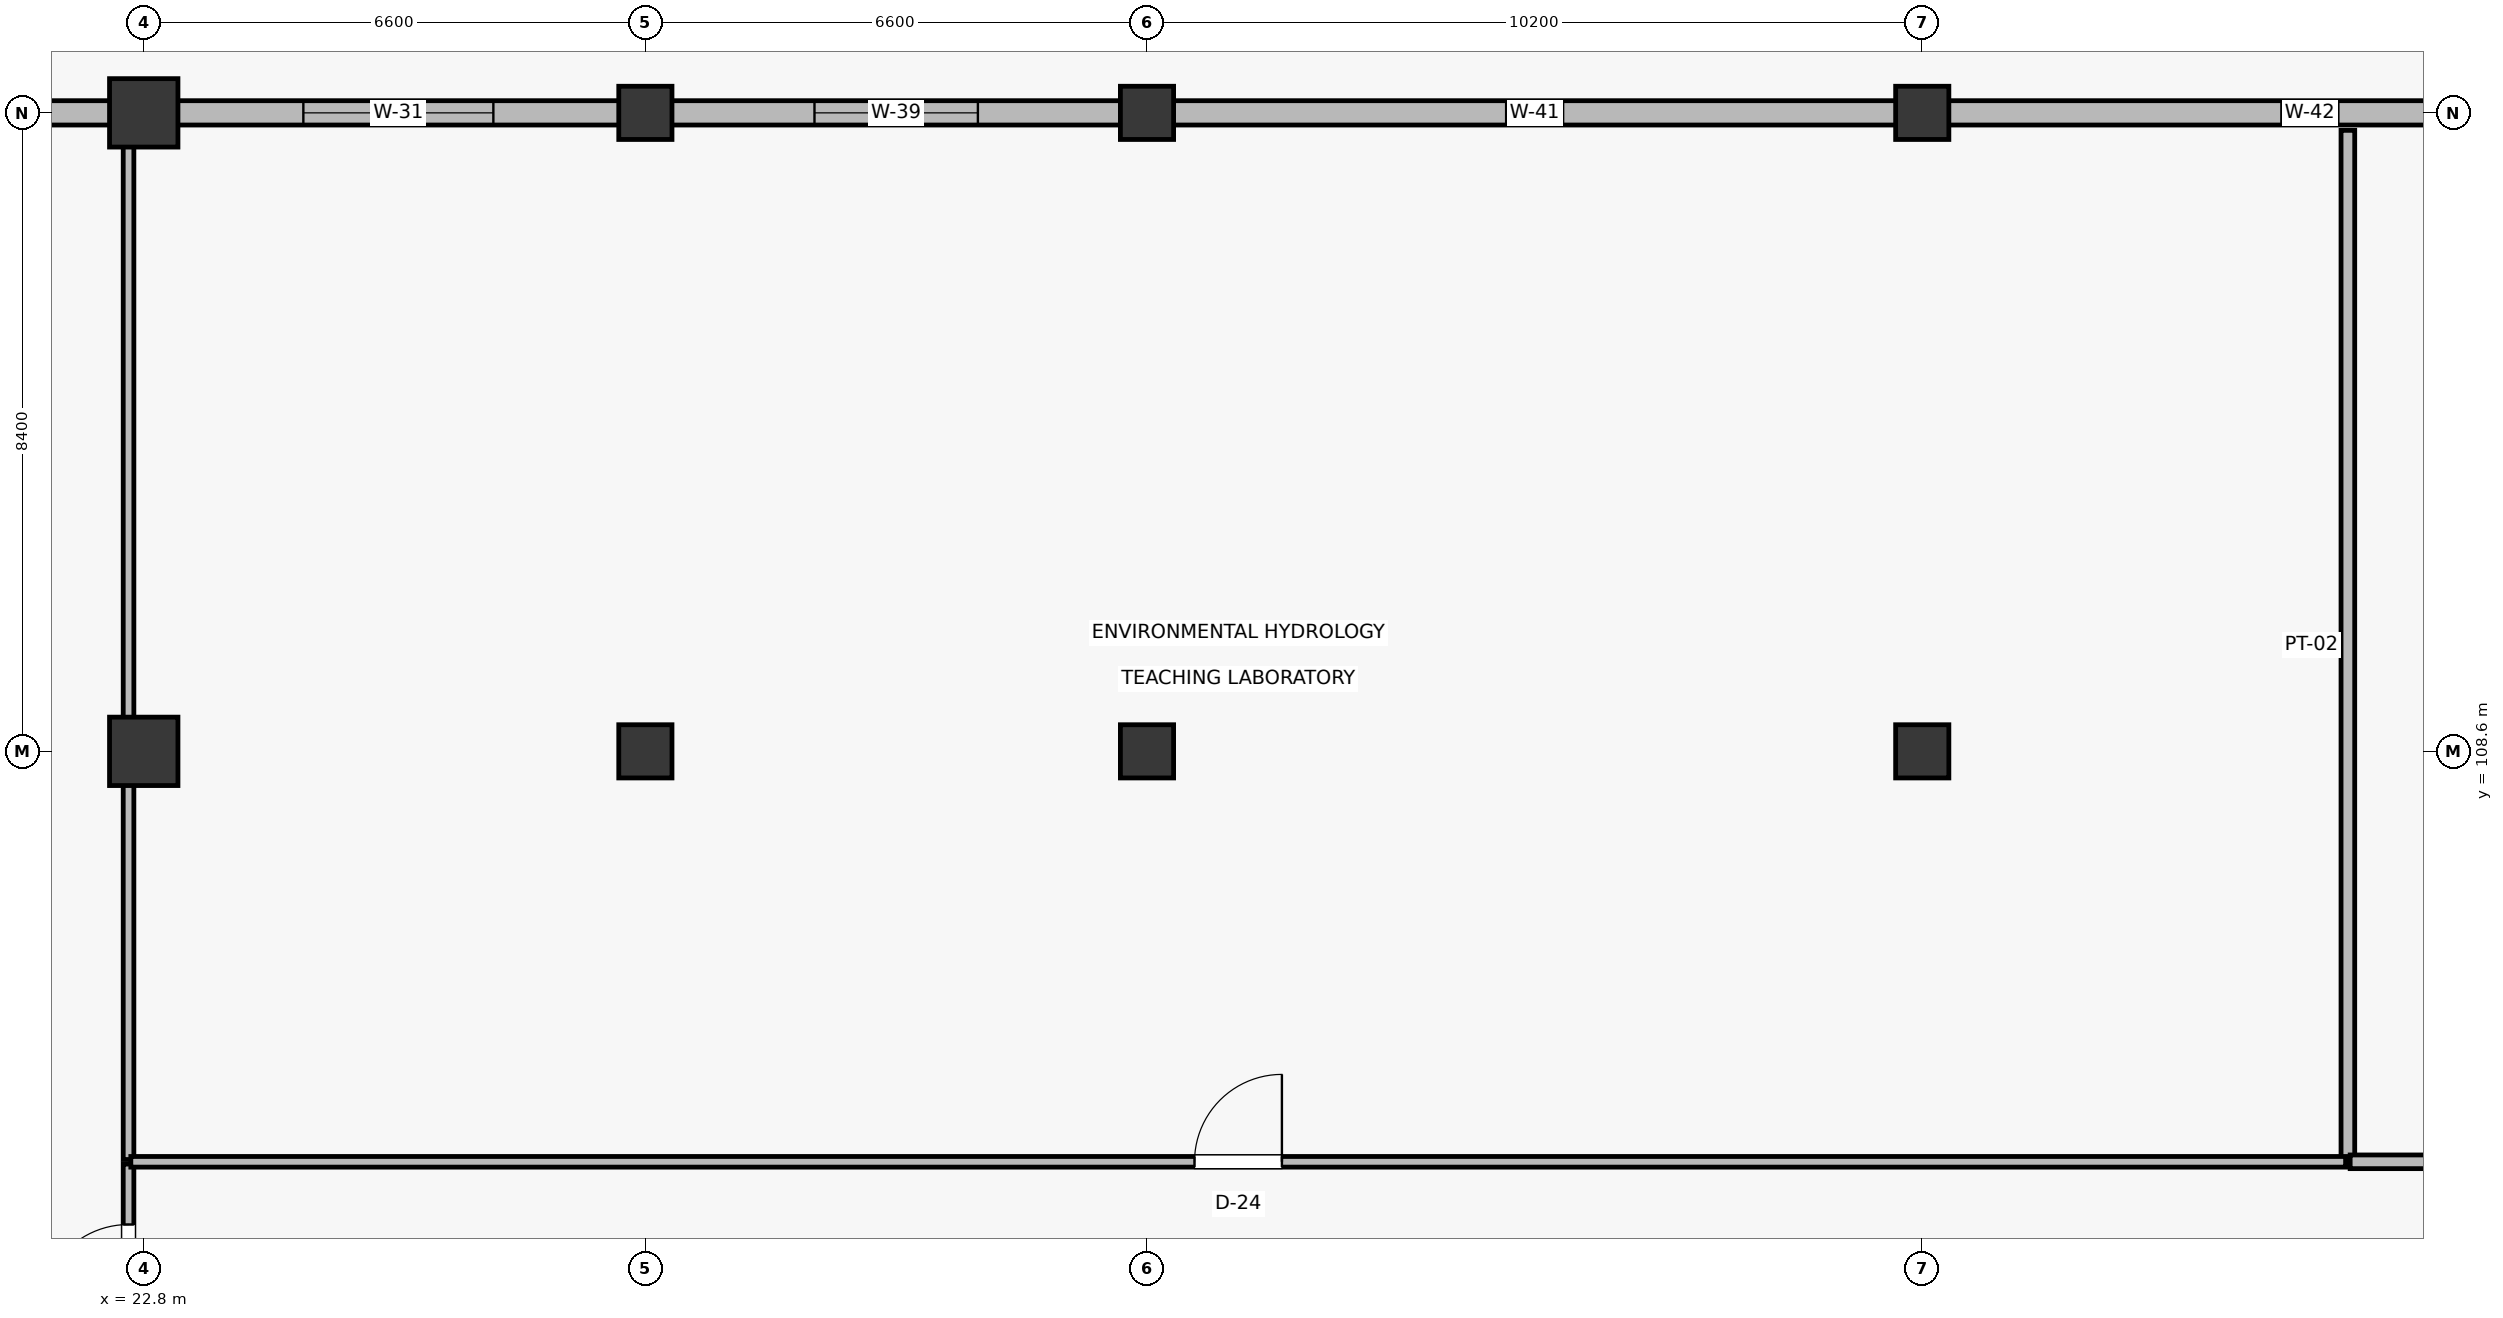
"""IFC4 building model, lengths in metres.
Left out: names, types, materials, properties, quantities, classifications, styles, units other than length and angle.
Written with IfcOpenShell. Run it as: python <this file> out.ifc"""

import sys

from ifc_helpers import new_model, si_unit, direction, frame, frame_2d, origin, origin_2d, place, context, subcontext, project, spatial, rectangle, extrude, element, fill, save


model = new_model("IFC4")
c1 = context("Model", 3, precision=1e-05, world=origin(), true_north=direction((0.0, 1.0)))
c2 = subcontext(c1, "Body", "Model", "MODEL_VIEW")
j1 = project(units=[si_unit("LENGTHUNIT", "METRE"), si_unit("PLANEANGLEUNIT", "RADIAN")], contexts=[c1])
p1 = place(None, origin())
s1 = spatial("IfcSite", under=j1, at=p1, CompositionType="ELEMENT")
p2 = place(p1, origin())
s2 = spatial("IfcBuilding", under=s1, at=p2, CompositionType="ELEMENT")
p3 = place(p2, origin())
s3 = spatial("IfcBuildingStorey", under=s2, at=p3, CompositionType="ELEMENT", Elevation=0.0)
for number, where, z_axis, x_axis in (
    (1, (22.8, 108.6, 0.0), (0.0, 0.0, 1.0), (1.0, 0.0, 0.0)),
    (2, (22.8, 117.0, 0.0), (0.0, 0.0, 1.0), (1.0, 0.0, 0.0)),
):
    element("IfcColumn", number, at=place(p3, frame(where, z_axis=z_axis, x_axis=x_axis)), inside=s3, PredefinedType="COLUMN", context=c2, shape_type="SweptSolid", body=[
        extrude(rectangle(XDim=0.9, YDim=0.9, at=origin_2d()), origin(), (0.0, 0.0, 1.0), 5.4),
    ])
for number, where, z_axis, x_axis in (
    (3, (29.4, 108.6, 0.0), (0.0, 0.0, 1.0), (1.0, 0.0, 0.0)),
    (4, (29.4, 117.0, 0.0), (0.0, 0.0, 1.0), (1.0, 0.0, 0.0)),
    (5, (36.0, 108.6, 0.0), (0.0, 0.0, 1.0), (1.0, 0.0, 0.0)),
    (6, (36.0, 117.0, 0.0), (0.0, 0.0, 1.0), (1.0, 0.0, 0.0)),
    (7, (46.2, 108.6, 0.0), (0.0, 0.0, 1.0), (1.0, 0.0, 0.0)),
    (8, (46.2, 117.0, 0.0), (0.0, 0.0, 1.0), (1.0, 0.0, 0.0)),
):
    element("IfcColumn", number, at=place(p3, frame(where, z_axis=z_axis, x_axis=x_axis)), inside=s3, PredefinedType="COLUMN", context=c2, shape_type="SweptSolid", body=[
        extrude(rectangle(XDim=0.7, YDim=0.7, at=origin_2d()), origin(), (0.0, 0.0, 1.0), 5.4),
    ])
p4 = place(p3, frame((3.435, 117.0, 0.0), z_axis=(0.0, 0.0, 1.0), x_axis=(1.0, 0.0, 0.0)))
e9 = element("IfcWall", 9, at=p4, inside=s3, PredefinedType="SOLIDWALL", context=c2, shape_type="SweptSolid", body=[
    extrude(rectangle(XDim=18.93, YDim=0.32, at=frame_2d((9.465, 0.0))), origin(), (0.0, 0.0, 1.0), 4.375),
])
p5 = place(p4, frame((8.29, 0.0, 0.95)))
e10 = element("IfcOpeningElement", 10, at=p5, cuts=e9, PredefinedType="OPENING", context=c2, shape_type="SweptSolid", body=[
    extrude(rectangle(XDim=2.35, YDim=1.9, at=frame_2d((1.175, 0.95))), frame((0.0, 0.17, 0.0), z_axis=(0.0, -1.0, 0.0), x_axis=(1.0, 0.0, 0.0)), (0.0, 0.0, 1.0), 0.34),
])
p6 = place(p3, frame((23.235, 117.0, 0.0), z_axis=(0.0, 0.0, 1.0), x_axis=(1.0, 0.0, 0.0)))
e11 = element("IfcWall", 11, at=p6, inside=s3, PredefinedType="SOLIDWALL", context=c2, shape_type="SweptSolid", body=[
    extrude(rectangle(XDim=5.83, YDim=0.32, at=frame_2d((2.915, 0.0))), origin(), (0.0, 0.0, 1.0), 4.375),
])
p7 = place(p6, frame((1.665, 0.0, 0.9)))
e12 = element("IfcOpeningElement", 12, at=p7, cuts=e11, PredefinedType="OPENING", context=c2, shape_type="SweptSolid", body=[
    extrude(rectangle(XDim=2.5, YDim=1.95, at=frame_2d((1.25, 0.975))), frame((0.0, 0.17, 0.0), z_axis=(0.0, -1.0, 0.0), x_axis=(1.0, 0.0, 0.0)), (0.0, 0.0, 1.0), 0.34),
])
p8 = place(p3, frame((29.735, 117.0, 0.0), z_axis=(0.0, 0.0, 1.0), x_axis=(1.0, 0.0, 0.0)))
e13 = element("IfcWall", 13, at=p8, inside=s3, PredefinedType="SOLIDWALL", context=c2, shape_type="SweptSolid", body=[
    extrude(rectangle(XDim=5.93, YDim=0.32, at=frame_2d((2.965, 0.0))), origin(), (0.0, 0.0, 1.0), 4.375),
])
p9 = place(p8, frame((1.89, 0.0, 0.9)))
e14 = element("IfcOpeningElement", 14, at=p9, cuts=e13, PredefinedType="OPENING", context=c2, shape_type="SweptSolid", body=[
    extrude(rectangle(XDim=2.15, YDim=1.7, at=frame_2d((1.075, 0.85))), frame((0.0, 0.17, 0.0), z_axis=(0.0, -1.0, 0.0), x_axis=(1.0, 0.0, 0.0)), (0.0, 0.0, 1.0), 0.34),
])
p10 = place(p3, frame((36.335, 117.0, 0.0), z_axis=(0.0, 0.0, 1.0), x_axis=(1.0, 0.0, 0.0)))
e15 = element("IfcWall", 15, at=p10, inside=s3, PredefinedType="SOLIDWALL", context=c2, shape_type="SweptSolid", body=[
    extrude(rectangle(XDim=9.53, YDim=0.32, at=frame_2d((4.765, 0.0))), origin(), (0.0, 0.0, 1.0), 4.375),
])
p11 = place(p10, frame((4.39, 0.0, 0.9)))
e16 = element("IfcOpeningElement", 16, at=p11, cuts=e15, PredefinedType="OPENING", context=c2, shape_type="SweptSolid", body=[
    extrude(rectangle(XDim=0.75, YDim=1.15, at=frame_2d((0.375, 0.575))), frame((0.0, 0.17, 0.0), z_axis=(0.0, -1.0, 0.0), x_axis=(1.0, 0.0, 0.0)), (0.0, 0.0, 1.0), 0.34),
])
p12 = place(p3, frame((46.535, 117.0, 0.0), z_axis=(0.0, 0.0, 1.0), x_axis=(1.0, 0.0, 0.0)))
e17 = element("IfcWall", 17, at=p12, inside=s3, PredefinedType="SOLIDWALL", context=c2, shape_type="SweptSolid", body=[
    extrude(rectangle(XDim=9.53, YDim=0.32, at=frame_2d((4.765, 0.0))), origin(), (0.0, 0.0, 1.0), 4.375),
])
p13 = place(p12, frame((4.39, 0.0, 0.9)))
e18 = element("IfcOpeningElement", 18, at=p13, cuts=e17, PredefinedType="OPENING", context=c2, shape_type="SweptSolid", body=[
    extrude(rectangle(XDim=0.75, YDim=1.35, at=frame_2d((0.375, 0.675))), frame((0.0, 0.17, 0.0), z_axis=(0.0, -1.0, 0.0), x_axis=(1.0, 0.0, 0.0)), (0.0, 0.0, 1.0), 0.34),
])
p14 = place(p3, frame((22.6, 103.23, 0.0), z_axis=(0.0, 0.0, 1.0), x_axis=(0.0, 1.0, 0.0)))
e19 = element("IfcWall", 19, at=p14, inside=s3, PredefinedType="PARTITIONING", context=c2, shape_type="SweptSolid", body=[
    extrude(rectangle(XDim=13.54, YDim=0.14, at=frame_2d((6.77, 0.0))), origin(), (0.0, 0.0, 1.0), 4.425),
])
p15 = place(p3, frame((22.6, 100.43, 0.0), z_axis=(0.0, 0.0, 1.0), x_axis=(0.0, 1.0, 0.0)))
e20 = element("IfcWall", 20, at=p15, inside=s3, PredefinedType="PARTITIONING", context=c2, shape_type="SweptSolid", body=[
    extrude(rectangle(XDim=2.74, YDim=0.14, at=frame_2d((1.37, 0.0))), origin(), (0.0, 0.0, 1.0), 4.425),
])
p16 = place(p15, frame((0.795, 0.0, 0.0)))
e21 = element("IfcOpeningElement", 21, at=p16, cuts=e20, PredefinedType="OPENING", context=c2, shape_type="SweptSolid", body=[
    extrude(rectangle(XDim=1.15, YDim=2.15, at=frame_2d((0.575, 1.075))), frame((0.0, 0.08, 0.0), z_axis=(0.0, -1.0, 0.0), x_axis=(1.0, 0.0, 0.0)), (0.0, 0.0, 1.0), 0.16),
])
p17 = place(p3, frame((51.8, 103.23, 0.0), z_axis=(0.0, 0.0, 1.0), x_axis=(0.0, 1.0, 0.0)))
e22 = element("IfcWall", 22, at=p17, inside=s3, PredefinedType="PARTITIONING", context=c2, shape_type="SweptSolid", body=[
    extrude(rectangle(XDim=13.54, YDim=0.18, at=frame_2d((6.77, 0.0))), origin(), (0.0, 0.0, 1.0), 4.315),
])
p18 = place(p3, frame((22.63, 103.2, 0.0), z_axis=(0.0, 0.0, 1.0), x_axis=(1.0, 0.0, 0.0)))
e23 = element("IfcWall", 23, at=p18, inside=s3, PredefinedType="PARTITIONING", context=c2, shape_type="SweptSolid", body=[
    extrude(rectangle(XDim=29.14, YDim=0.14, at=frame_2d((14.57, 0.0))), origin(), (0.0, 0.0, 1.0), 4.425),
])
p19 = place(p18, frame((13.995, 0.0, 0.0)))
e24 = element("IfcOpeningElement", 24, at=p19, cuts=e23, PredefinedType="OPENING", context=c2, shape_type="SweptSolid", body=[
    extrude(rectangle(XDim=1.15, YDim=2.15, at=frame_2d((0.575, 1.075))), frame((0.0, 0.08, 0.0), z_axis=(0.0, -1.0, 0.0), x_axis=(1.0, 0.0, 0.0)), (0.0, 0.0, 1.0), 0.16),
])
p20 = place(p3, frame((51.83, 103.2, 0.0), z_axis=(0.0, 0.0, 1.0), x_axis=(1.0, 0.0, 0.0)))
e25 = element("IfcWall", 25, at=p20, inside=s3, PredefinedType="PARTITIONING", context=c2, shape_type="SweptSolid", body=[
    extrude(rectangle(XDim=18.19, YDim=0.18, at=frame_2d((9.095, 0.0))), origin(), (0.0, 0.0, 1.0), 4.425),
])
p21 = place(p20, frame((8.395, 0.0, 0.0)))
e26 = element("IfcOpeningElement", 26, at=p21, cuts=e25, PredefinedType="OPENING", context=c2, shape_type="SweptSolid", body=[
    extrude(rectangle(XDim=1.4, YDim=2.2, at=frame_2d((0.7, 1.1))), frame((0.0, 0.1, 0.0), z_axis=(0.0, -1.0, 0.0), x_axis=(1.0, 0.0, 0.0)), (0.0, 0.0, 1.0), 0.2),
])
p22 = place(p7, origin())
e27 = element("IfcWindow", 27, at=p22, inside=s3, PartitioningType="DOUBLE_PANEL_VERTICAL", PredefinedType="WINDOW", context=c2, shape_type="SweptSolid", body=[
    extrude(rectangle(XDim=2.5, YDim=1.95, at=frame_2d((1.25, 0.975))), frame((0.0, 0.03, 0.0), z_axis=(0.0, -1.0, 0.0), x_axis=(1.0, 0.0, 0.0)), (0.0, 0.0, 1.0), 0.06),
])
fill(e12, e27)
p23 = place(p9, origin())
e28 = element("IfcWindow", 28, at=p23, inside=s3, PartitioningType="DOUBLE_PANEL_VERTICAL", PredefinedType="WINDOW", context=c2, shape_type="SweptSolid", body=[
    extrude(rectangle(XDim=2.15, YDim=1.7, at=frame_2d((1.075, 0.85))), frame((0.0, 0.03, 0.0), z_axis=(0.0, -1.0, 0.0), x_axis=(1.0, 0.0, 0.0)), (0.0, 0.0, 1.0), 0.06),
])
fill(e14, e28)
p24 = place(p11, origin())
e29 = element("IfcWindow", 29, at=p24, inside=s3, PartitioningType="DOUBLE_PANEL_VERTICAL", PredefinedType="WINDOW", context=c2, shape_type="SweptSolid", body=[
    extrude(rectangle(XDim=0.75, YDim=1.15, at=frame_2d((0.375, 0.575))), frame((0.0, 0.03, 0.0), z_axis=(0.0, -1.0, 0.0), x_axis=(1.0, 0.0, 0.0)), (0.0, 0.0, 1.0), 0.06),
])
fill(e16, e29)
p25 = place(p13, origin())
e30 = element("IfcWindow", 30, at=p25, inside=s3, PartitioningType="DOUBLE_PANEL_VERTICAL", PredefinedType="WINDOW", context=c2, shape_type="SweptSolid", body=[
    extrude(rectangle(XDim=0.75, YDim=1.35, at=frame_2d((0.375, 0.675))), frame((0.0, 0.03, 0.0), z_axis=(0.0, -1.0, 0.0), x_axis=(1.0, 0.0, 0.0)), (0.0, 0.0, 1.0), 0.06),
])
fill(e18, e30)
p26 = place(p16, origin())
e31 = element("IfcDoor", 31, at=p26, inside=s3, OperationType="SINGLE_SWING_LEFT", PredefinedType="DOOR", context=c2, shape_type="SweptSolid", body=[
    extrude(rectangle(XDim=1.15, YDim=2.15, at=frame_2d((0.575, 1.075))), frame((0.0, 0.025, 0.0), z_axis=(0.0, -1.0, 0.0), x_axis=(1.0, 0.0, 0.0)), (0.0, 0.0, 1.0), 0.05),
])
fill(e21, e31)
p27 = place(p19, origin())
e32 = element("IfcDoor", 32, at=p27, inside=s3, OperationType="SINGLE_SWING_RIGHT", PredefinedType="DOOR", context=c2, shape_type="SweptSolid", body=[
    extrude(rectangle(XDim=1.15, YDim=2.15, at=frame_2d((0.575, 1.075))), frame((0.0, 0.025, 0.0), z_axis=(0.0, -1.0, 0.0), x_axis=(1.0, 0.0, 0.0)), (0.0, 0.0, 1.0), 0.05),
])
fill(e24, e32)
save(model, sys.argv[1])
